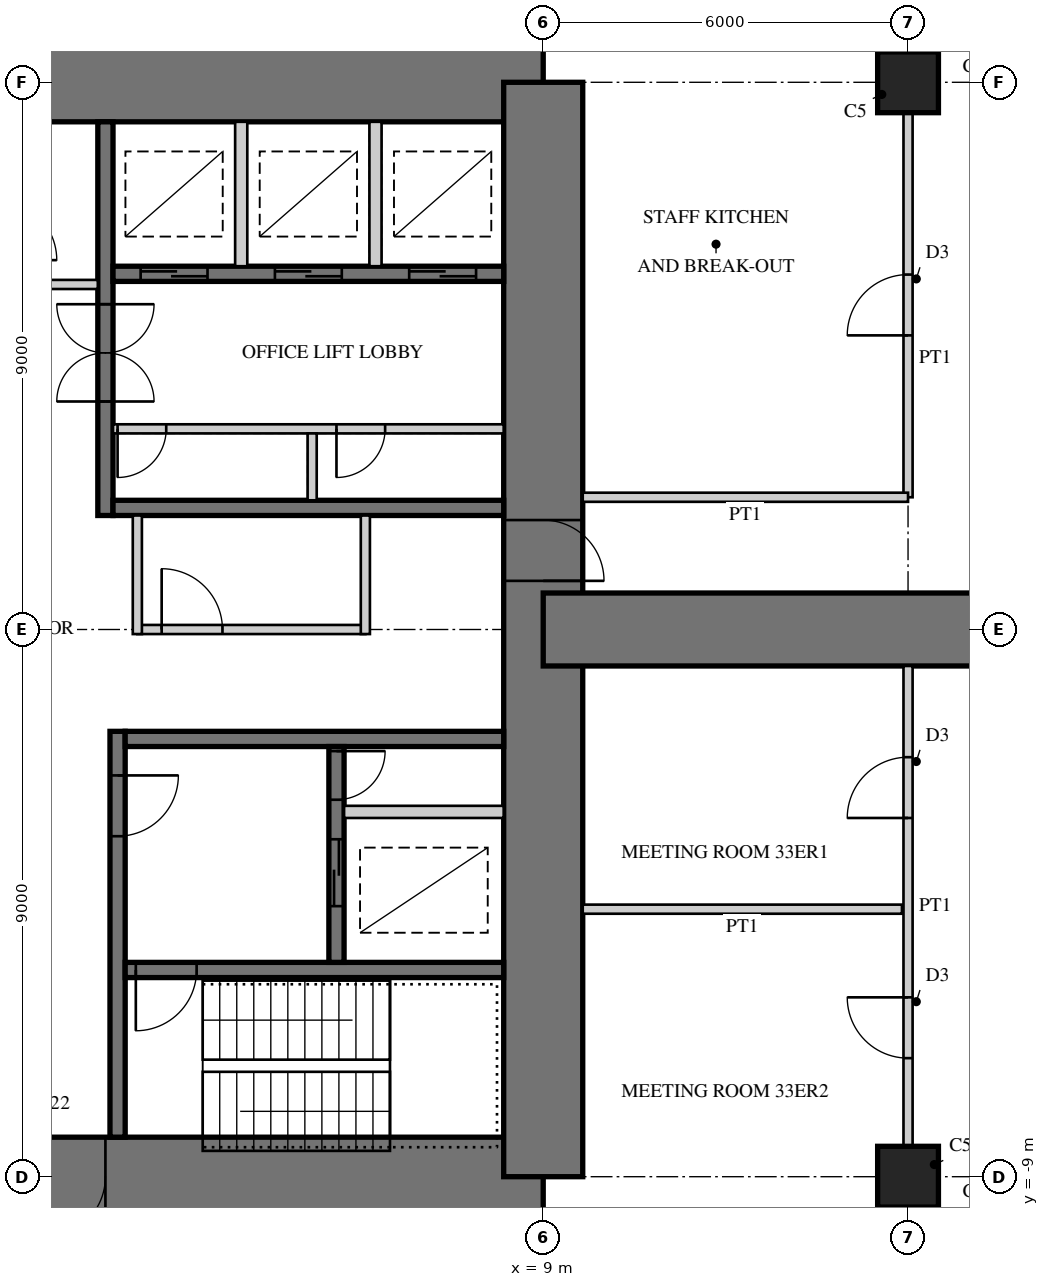
"""IFC4 building model, lengths in metres.
Left out: names, types, materials, properties, quantities, classifications, styles, units other than length and angle.
Written with IfcOpenShell. Run it as: python <this file> out.ifc"""

import sys

from ifc_helpers import new_model, si_unit, direction, frame, frame_2d, origin, origin_2d, place, context, subcontext, project, spatial, rectangle, extrude, element, fill, save


model = new_model("IFC4")
c1 = context("Model", 3, precision=1e-05, world=origin(), true_north=direction((0.0, 1.0)))
c2 = subcontext(c1, "Body", "Model", "MODEL_VIEW")
j1 = project(units=[si_unit("LENGTHUNIT", "METRE"), si_unit("PLANEANGLEUNIT", "RADIAN")], contexts=[c1])
p1 = place(None, origin())
s1 = spatial("IfcSite", under=j1, at=p1, CompositionType="ELEMENT")
p2 = place(p1, origin())
s2 = spatial("IfcBuilding", under=s1, at=p2, CompositionType="ELEMENT")
p3 = place(p2, frame((0.0, 0.0, 136.5)))
s3 = spatial("IfcBuildingStorey", under=s2, at=p3, CompositionType="ELEMENT", Elevation=136.5)
p4 = place(p3, frame((9.0, 9.0, 0.0), z_axis=(0.0, 0.0, 1.0), x_axis=(-1.0, 0.0, 0.0)))
e1 = element("IfcWall", 1, at=p4, inside=s3, PredefinedType="SHEAR", context=c2, shape_type="SweptSolid", body=[
    extrude(rectangle(XDim=18.0, YDim=1.3, at=frame_2d((9.0, 0.0))), origin(), (0.0, 0.0, 1.0), 4.0),
])
p5 = place(p4, frame((9.8, 0.0, 0.0)))
e2 = element("IfcOpeningElement", 2, at=p5, cuts=e1, PredefinedType="OPENING", context=c2, shape_type="SweptSolid", body=[
    extrude(rectangle(XDim=1.0, YDim=2.4, at=frame_2d((0.5, 1.2))), frame((0.0, 0.66, 0.0), z_axis=(0.0, -1.0, 0.0), x_axis=(1.0, 0.0, 0.0)), (0.0, 0.0, 1.0), 1.32),
])
p6 = place(p3, frame((-9.0, -9.0, 0.0), z_axis=(0.0, 0.0, 1.0), x_axis=(1.0, 0.0, 0.0)))
e3 = element("IfcWall", 3, at=p6, inside=s3, PredefinedType="SHEAR", context=c2, shape_type="SweptSolid", body=[
    extrude(rectangle(XDim=18.0, YDim=1.3, at=frame_2d((9.0, 0.0))), origin(), (0.0, 0.0, 1.0), 4.0),
])
p7 = place(p6, frame((9.8, 0.0, 0.0)))
e4 = element("IfcOpeningElement", 4, at=p7, cuts=e3, PredefinedType="OPENING", context=c2, shape_type="SweptSolid", body=[
    extrude(rectangle(XDim=1.0, YDim=2.4, at=frame_2d((0.5, 1.2))), frame((0.0, 0.66, 0.0), z_axis=(0.0, -1.0, 0.0), x_axis=(1.0, 0.0, 0.0)), (0.0, 0.0, 1.0), 1.32),
])
p8 = place(p3, frame((9.0, -9.0, 0.0), z_axis=(0.0, 0.0, 1.0), x_axis=(0.0, 1.0, 0.0)))
e5 = element("IfcWall", 5, at=p8, inside=s3, PredefinedType="SHEAR", context=c2, shape_type="SweptSolid", body=[
    extrude(rectangle(XDim=18.0, YDim=1.3, at=frame_2d((9.0, 0.0))), origin(), (0.0, 0.0, 1.0), 4.0),
])
p9 = place(p8, frame((9.8, 0.0, 0.0)))
e6 = element("IfcOpeningElement", 6, at=p9, cuts=e5, PredefinedType="OPENING", context=c2, shape_type="SweptSolid", body=[
    extrude(rectangle(XDim=1.0, YDim=2.4, at=frame_2d((0.5, 1.2))), frame((0.0, 0.66, 0.0), z_axis=(0.0, -1.0, 0.0), x_axis=(1.0, 0.0, 0.0)), (0.0, 0.0, 1.0), 1.32),
])
p10 = place(p3, frame((1.8, 1.875, 0.0), z_axis=(0.0, 0.0, 1.0), x_axis=(0.0, 1.0, 0.0)))
e7 = element("IfcWall", 7, at=p10, inside=s3, PredefinedType="SHEAR", context=c2, shape_type="SweptSolid", body=[
    extrude(rectangle(XDim=6.475, YDim=0.25, at=frame_2d((3.238, 0.0))), origin(), (0.0, 0.0, 1.0), 4.0),
])
p11 = place(p10, frame((1.875, 0.0, 0.0)))
e8 = element("IfcOpeningElement", 8, at=p11, cuts=e7, PredefinedType="OPENING", context=c2, shape_type="SweptSolid", body=[
    extrude(rectangle(XDim=1.6, YDim=2.4, at=frame_2d((0.8, 1.2))), frame((0.0, 0.135, 0.0), z_axis=(0.0, -1.0, 0.0), x_axis=(1.0, 0.0, 0.0)), (0.0, 0.0, 1.0), 0.27),
])
p12 = place(p3, frame((1.925, 2.0, 0.0), z_axis=(0.0, 0.0, 1.0), x_axis=(1.0, 0.0, 0.0)))
e9 = element("IfcWall", 9, at=p12, inside=s3, PredefinedType="SHEAR", context=c2, shape_type="SweptSolid", body=[
    extrude(rectangle(XDim=6.425, YDim=0.25, at=frame_2d((3.212, 0.0))), origin(), (0.0, 0.0, 1.0), 4.0),
])
p13 = place(p3, frame((1.925, 5.85, 0.0), z_axis=(0.0, 0.0, 1.0), x_axis=(1.0, 0.0, 0.0)))
e10 = element("IfcWall", 10, at=p13, inside=s3, PredefinedType="SHEAR", context=c2, shape_type="SweptSolid", body=[
    extrude(rectangle(XDim=6.425, YDim=0.25, at=frame_2d((3.212, 0.0))), origin(), (0.0, 0.0, 1.0), 4.0),
])
p14 = place(p13, frame((0.454, 0.0, 0.0)))
e11 = element("IfcOpeningElement", 11, at=p14, cuts=e10, PredefinedType="OPENING", context=c2, shape_type="SweptSolid", body=[
    extrude(rectangle(XDim=1.1, YDim=2.2, at=frame_2d((0.55, 1.1))), frame((0.0, 0.135, 0.0), z_axis=(0.0, -1.0, 0.0), x_axis=(1.0, 0.0, 0.0)), (0.0, 0.0, 1.0), 0.27),
])
p15 = place(p13, frame((2.663, 0.0, 0.0)))
e12 = element("IfcOpeningElement", 12, at=p15, cuts=e10, PredefinedType="OPENING", context=c2, shape_type="SweptSolid", body=[
    extrude(rectangle(XDim=1.1, YDim=2.2, at=frame_2d((0.55, 1.1))), frame((0.0, 0.135, 0.0), z_axis=(0.0, -1.0, 0.0), x_axis=(1.0, 0.0, 0.0)), (0.0, 0.0, 1.0), 0.27),
])
p16 = place(p13, frame((4.871, 0.0, 0.0)))
e13 = element("IfcOpeningElement", 13, at=p16, cuts=e10, PredefinedType="OPENING", context=c2, shape_type="SweptSolid", body=[
    extrude(rectangle(XDim=1.1, YDim=2.2, at=frame_2d((0.55, 1.1))), frame((0.0, 0.135, 0.0), z_axis=(0.0, -1.0, 0.0), x_axis=(1.0, 0.0, 0.0)), (0.0, 0.0, 1.0), 0.27),
])
p17 = place(p3, frame((1.925, 3.3, 0.0), z_axis=(0.0, 0.0, 1.0), x_axis=(1.0, 0.0, 0.0)))
e14 = element("IfcWall", 14, at=p17, inside=s3, PredefinedType="PARTITIONING", context=c2, shape_type="SweptSolid", body=[
    extrude(rectangle(XDim=6.425, YDim=0.15, at=frame_2d((3.212, 0.0))), origin(), (0.0, 0.0, 1.0), 4.0),
])
p18 = place(p17, frame((0.075, 0.0, 0.0)))
e15 = element("IfcOpeningElement", 15, at=p18, cuts=e14, PredefinedType="OPENING", context=c2, shape_type="SweptSolid", body=[
    extrude(rectangle(XDim=0.8, YDim=2.1, at=frame_2d((0.4, 1.05))), frame((0.0, 0.085, 0.0), z_axis=(0.0, -1.0, 0.0), x_axis=(1.0, 0.0, 0.0)), (0.0, 0.0, 1.0), 0.17),
])
p19 = place(p17, frame((3.675, 0.0, 0.0)))
e16 = element("IfcOpeningElement", 16, at=p19, cuts=e14, PredefinedType="OPENING", context=c2, shape_type="SweptSolid", body=[
    extrude(rectangle(XDim=0.8, YDim=2.1, at=frame_2d((0.4, 1.05))), frame((0.0, 0.085, 0.0), z_axis=(0.0, -1.0, 0.0), x_axis=(1.0, 0.0, 0.0)), (0.0, 0.0, 1.0), 0.17),
])
p20 = place(p3, frame((5.2, 2.125, 0.0), z_axis=(0.0, 0.0, 1.0), x_axis=(0.0, 1.0, 0.0)))
e17 = element("IfcWall", 17, at=p20, inside=s3, PredefinedType="PARTITIONING", context=c2, shape_type="SweptSolid", body=[
    extrude(rectangle(XDim=1.1, YDim=0.15, at=frame_2d((0.55, 0.0))), origin(), (0.0, 0.0, 1.0), 4.0),
])
for number, where, z_axis, x_axis in (
    (18, (4.033, 5.975, 0.0), (0.0, 0.0, 1.0), (0.0, 1.0, 0.0)),
    (19, (6.242, 5.975, 0.0), (0.0, 0.0, 1.0), (0.0, 1.0, 0.0)),
):
    element("IfcWall", number, at=place(p3, frame(where, z_axis=z_axis, x_axis=x_axis)), inside=s3, PredefinedType="PARTITIONING", context=c2, shape_type="SweptSolid", body=[
        extrude(rectangle(XDim=2.375, YDim=0.2, at=frame_2d((1.188, 0.0))), origin(), (0.0, 0.0, 1.0), 4.0),
    ])
p21 = place(p3, frame((2.0, -1.675, 0.0), z_axis=(0.0, 0.0, 1.0), x_axis=(0.0, -1.0, 0.0)))
e20 = element("IfcWall", 20, at=p21, inside=s3, PredefinedType="SHEAR", context=c2, shape_type="SweptSolid", body=[
    extrude(rectangle(XDim=6.675, YDim=0.25, at=frame_2d((3.337, 0.0))), origin(), (0.0, 0.0, 1.0), 4.0),
])
p22 = place(p21, frame((0.725, 0.0, 0.0)))
e21 = element("IfcOpeningElement", 21, at=p22, cuts=e20, PredefinedType="OPENING", context=c2, shape_type="SweptSolid", body=[
    extrude(rectangle(XDim=1.0, YDim=2.1, at=frame_2d((0.5, 1.05))), frame((0.0, 0.135, 0.0), z_axis=(0.0, -1.0, 0.0), x_axis=(1.0, 0.0, 0.0)), (0.0, 0.0, 1.0), 0.27),
])
p23 = place(p3, frame((2.125, -1.8, 0.0), z_axis=(0.0, 0.0, 1.0), x_axis=(1.0, 0.0, 0.0)))
e22 = element("IfcWall", 22, at=p23, inside=s3, PredefinedType="SHEAR", context=c2, shape_type="SweptSolid", body=[
    extrude(rectangle(XDim=6.225, YDim=0.25, at=frame_2d((3.113, 0.0))), origin(), (0.0, 0.0, 1.0), 4.0),
])
p24 = place(p3, frame((2.125, -5.6, 0.0), z_axis=(0.0, 0.0, 1.0), x_axis=(1.0, 0.0, 0.0)))
e23 = element("IfcWall", 23, at=p24, inside=s3, PredefinedType="SHEAR", context=c2, shape_type="SweptSolid", body=[
    extrude(rectangle(XDim=6.225, YDim=0.25, at=frame_2d((3.113, 0.0))), origin(), (0.0, 0.0, 1.0), 4.0),
])
p25 = place(p24, frame((0.175, 0.0, 0.0)))
e24 = element("IfcOpeningElement", 24, at=p25, cuts=e23, PredefinedType="OPENING", context=c2, shape_type="SweptSolid", body=[
    extrude(rectangle(XDim=1.0, YDim=2.1, at=frame_2d((0.5, 1.05))), frame((0.0, 0.135, 0.0), z_axis=(0.0, -1.0, 0.0), x_axis=(1.0, 0.0, 0.0)), (0.0, 0.0, 1.0), 0.27),
])
p26 = place(p3, frame((5.6, -1.925, 0.0), z_axis=(0.0, 0.0, 1.0), x_axis=(0.0, -1.0, 0.0)))
e25 = element("IfcWall", 25, at=p26, inside=s3, PredefinedType="SHEAR", context=c2, shape_type="SweptSolid", body=[
    extrude(rectangle(XDim=3.55, YDim=0.25, at=frame_2d((1.775, 0.0))), origin(), (0.0, 0.0, 1.0), 4.0),
])
p27 = place(p26, frame((1.525, 0.0, 0.0)))
e26 = element("IfcOpeningElement", 26, at=p27, cuts=e25, PredefinedType="OPENING", context=c2, shape_type="SweptSolid", body=[
    extrude(rectangle(XDim=1.1, YDim=2.2, at=frame_2d((0.55, 1.1))), frame((0.0, 0.135, 0.0), z_axis=(0.0, -1.0, 0.0), x_axis=(1.0, 0.0, 0.0)), (0.0, 0.0, 1.0), 0.27),
])
p28 = place(p26, frame((0.075, 0.0, 0.0)))
e27 = element("IfcOpeningElement", 27, at=p28, cuts=e25, PredefinedType="OPENING", context=c2, shape_type="SweptSolid", body=[
    extrude(rectangle(XDim=0.8, YDim=2.1, at=frame_2d((0.4, 1.05))), frame((0.0, 0.135, 0.0), z_axis=(0.0, -1.0, 0.0), x_axis=(1.0, 0.0, 0.0)), (0.0, 0.0, 1.0), 0.27),
])
p29 = place(p3, frame((5.725, -3.0, 0.0), z_axis=(0.0, 0.0, 1.0), x_axis=(1.0, 0.0, 0.0)))
e28 = element("IfcWall", 28, at=p29, inside=s3, PredefinedType="PARTITIONING", context=c2, shape_type="SweptSolid", body=[
    extrude(rectangle(XDim=2.625, YDim=0.2, at=frame_2d((1.312, 0.0))), origin(), (0.0, 0.0, 1.0), 4.0),
])
p30 = place(p3, frame((9.0, 0.0, 0.0), z_axis=(0.0, 0.0, 1.0), x_axis=(1.0, 0.0, 0.0)))
e29 = element("IfcWall", 29, at=p30, inside=s3, PredefinedType="SHEAR", context=c2, shape_type="SweptSolid", body=[
    extrude(rectangle(XDim=18.0, YDim=1.2, at=frame_2d((9.0, 0.0))), origin(), (0.0, 0.0, 1.0), 4.0),
])
p31 = place(p30, frame((9.8, 0.0, 0.0)))
e30 = element("IfcOpeningElement", 30, at=p31, cuts=e29, PredefinedType="OPENING", context=c2, shape_type="SweptSolid", body=[
    extrude(rectangle(XDim=1.0, YDim=2.2, at=frame_2d((0.5, 1.1))), frame((0.0, 0.61, 0.0), z_axis=(0.0, -1.0, 0.0), x_axis=(1.0, 0.0, 0.0)), (0.0, 0.0, 1.0), 1.22),
])
for number, where, z_axis, x_axis in (
    (31, (15.0, -9.0, 0.0), (0.0, 0.0, 1.0), (1.0, 0.0, 0.0)),
    (32, (15.0, 9.0, 0.0), (0.0, 0.0, 1.0), (1.0, 0.0, 0.0)),
):
    element("IfcColumn", number, at=place(p3, frame(where, z_axis=z_axis, x_axis=x_axis)), inside=s3, PredefinedType="COLUMN", context=c2, shape_type="SweptSolid", body=[
        extrude(rectangle(XDim=1.0, YDim=1.0, at=origin_2d()), origin(), (0.0, 0.0, 1.0), 4.0),
    ])
p32 = place(p3, frame((2.325, 0.0, 0.0), z_axis=(0.0, 0.0, 1.0), x_axis=(1.0, 0.0, 0.0)))
e33 = element("IfcWall", 33, at=p32, inside=s3, PredefinedType="PARTITIONING", context=c2, shape_type="SweptSolid", body=[
    extrude(rectangle(XDim=3.75, YDim=0.15, at=frame_2d((1.875, 0.0))), origin(), (0.0, 0.0, 1.0), 3.8),
])
p33 = place(p32, frame((0.4, 0.0, 0.0)))
e34 = element("IfcOpeningElement", 34, at=p33, cuts=e33, PredefinedType="OPENING", context=c2, shape_type="SweptSolid", body=[
    extrude(rectangle(XDim=1.0, YDim=2.1, at=frame_2d((0.5, 1.05))), frame((0.0, 0.085, 0.0), z_axis=(0.0, -1.0, 0.0), x_axis=(1.0, 0.0, 0.0)), (0.0, 0.0, 1.0), 0.17),
])
for number, where, z_axis, x_axis in (
    (35, (2.325, 1.875, 0.0), (0.0, 0.0, 1.0), (0.0, -1.0, 0.0)),
    (36, (6.075, -0.075, 0.0), (0.0, 0.0, 1.0), (0.0, 1.0, 0.0)),
):
    element("IfcWall", number, at=place(p3, frame(where, z_axis=z_axis, x_axis=x_axis)), inside=s3, PredefinedType="PARTITIONING", context=c2, shape_type="SweptSolid", body=[
        extrude(rectangle(XDim=1.95, YDim=0.15, at=frame_2d((0.975, 0.0))), origin(), (0.0, 0.0, 1.0), 3.8),
    ])
p34 = place(p3, frame((1.675, 5.675, 0.0), z_axis=(0.0, 0.0, 1.0), x_axis=(-1.0, 0.0, 0.0)))
e37 = element("IfcWall", 37, at=p34, inside=s3, PredefinedType="PARTITIONING", context=c2, shape_type="SweptSolid", body=[
    extrude(rectangle(XDim=1.75, YDim=0.15, at=frame_2d((0.875, 0.0))), origin(), (0.0, 0.0, 1.0), 3.8),
])
p35 = place(p3, frame((15.0, 2.175, 0.0), z_axis=(0.0, 0.0, 1.0), x_axis=(0.0, 1.0, 0.0)))
e38 = element("IfcWall", 38, at=p35, inside=s3, PredefinedType="PARTITIONING", context=c2, shape_type="SweptSolid", body=[
    extrude(rectangle(XDim=6.325, YDim=0.15, at=frame_2d((3.163, 0.0))), origin(), (0.0, 0.0, 1.0), 3.0),
])
p36 = place(p35, frame((2.663, 0.0, 0.0)))
e39 = element("IfcOpeningElement", 39, at=p36, cuts=e38, PredefinedType="OPENING", context=c2, shape_type="SweptSolid", body=[
    extrude(rectangle(XDim=1.0, YDim=2.1, at=frame_2d((0.5, 1.05))), frame((0.0, 0.085, 0.0), z_axis=(0.0, -1.0, 0.0), x_axis=(1.0, 0.0, 0.0)), (0.0, 0.0, 1.0), 0.17),
])
p37 = place(p3, frame((9.65, 2.175, 0.0), z_axis=(0.0, 0.0, 1.0), x_axis=(1.0, 0.0, 0.0)))
e40 = element("IfcWall", 40, at=p37, inside=s3, PredefinedType="PARTITIONING", context=c2, shape_type="SweptSolid", body=[
    extrude(rectangle(XDim=5.35, YDim=0.15, at=frame_2d((2.675, 0.0))), origin(), (0.0, 0.0, 1.0), 3.8),
])
p38 = place(p3, frame((15.0, -8.5, 0.0), z_axis=(0.0, 0.0, 1.0), x_axis=(0.0, 1.0, 0.0)))
e41 = element("IfcWall", 41, at=p38, inside=s3, PredefinedType="PARTITIONING", context=c2, shape_type="SweptSolid", body=[
    extrude(rectangle(XDim=7.9, YDim=0.15, at=frame_2d((3.95, 0.0))), origin(), (0.0, 0.0, 1.0), 3.0),
])
p39 = place(p38, frame((1.45, 0.0, 0.0)))
e42 = element("IfcOpeningElement", 42, at=p39, cuts=e41, PredefinedType="OPENING", context=c2, shape_type="SweptSolid", body=[
    extrude(rectangle(XDim=1.0, YDim=2.1, at=frame_2d((0.5, 1.05))), frame((0.0, 0.085, 0.0), z_axis=(0.0, -1.0, 0.0), x_axis=(1.0, 0.0, 0.0)), (0.0, 0.0, 1.0), 0.17),
])
p40 = place(p38, frame((5.4, 0.0, 0.0)))
e43 = element("IfcOpeningElement", 43, at=p40, cuts=e41, PredefinedType="OPENING", context=c2, shape_type="SweptSolid", body=[
    extrude(rectangle(XDim=1.0, YDim=2.1, at=frame_2d((0.5, 1.05))), frame((0.0, 0.085, 0.0), z_axis=(0.0, -1.0, 0.0), x_axis=(1.0, 0.0, 0.0)), (0.0, 0.0, 1.0), 0.17),
])
p41 = place(p3, frame((9.65, -4.6, 0.0), z_axis=(0.0, 0.0, 1.0), x_axis=(1.0, 0.0, 0.0)))
e44 = element("IfcWall", 44, at=p41, inside=s3, PredefinedType="PARTITIONING", context=c2, shape_type="SweptSolid", body=[
    extrude(rectangle(XDim=5.25, YDim=0.15, at=frame_2d((2.625, 0.0))), origin(), (0.0, 0.0, 1.0), 3.8),
])
p42 = place(p33, origin())
e45 = element("IfcDoor", 45, at=p42, inside=s3, OperationType="SINGLE_SWING_LEFT", PredefinedType="DOOR", context=c2, shape_type="SweptSolid", body=[
    extrude(rectangle(XDim=1.0, YDim=2.1, at=frame_2d((0.5, 1.05))), frame((0.0, 0.025, 0.0), z_axis=(0.0, -1.0, 0.0), x_axis=(1.0, 0.0, 0.0)), (0.0, 0.0, 1.0), 0.05),
])
fill(e34, e45)
p43 = place(p36, origin())
e46 = element("IfcDoor", 46, at=p43, inside=s3, OperationType="SINGLE_SWING_LEFT", PredefinedType="DOOR", context=c2, shape_type="SweptSolid", body=[
    extrude(rectangle(XDim=1.0, YDim=2.1, at=frame_2d((0.5, 1.05))), frame((0.0, 0.025, 0.0), z_axis=(0.0, -1.0, 0.0), x_axis=(1.0, 0.0, 0.0)), (0.0, 0.0, 1.0), 0.05),
])
fill(e39, e46)
p44 = place(p39, origin())
e47 = element("IfcDoor", 47, at=p44, inside=s3, OperationType="SINGLE_SWING_RIGHT", PredefinedType="DOOR", context=c2, shape_type="SweptSolid", body=[
    extrude(rectangle(XDim=1.0, YDim=2.1, at=frame_2d((0.5, 1.05))), frame((0.0, 0.025, 0.0), z_axis=(0.0, -1.0, 0.0), x_axis=(1.0, 0.0, 0.0)), (0.0, 0.0, 1.0), 0.05),
])
fill(e42, e47)
p45 = place(p40, origin())
e48 = element("IfcDoor", 48, at=p45, inside=s3, OperationType="SINGLE_SWING_LEFT", PredefinedType="DOOR", context=c2, shape_type="SweptSolid", body=[
    extrude(rectangle(XDim=1.0, YDim=2.1, at=frame_2d((0.5, 1.05))), frame((0.0, 0.025, 0.0), z_axis=(0.0, -1.0, 0.0), x_axis=(1.0, 0.0, 0.0)), (0.0, 0.0, 1.0), 0.05),
])
fill(e43, e48)
p46 = place(p7, frame((1.0, 0.0, 0.0), z_axis=(0.0, 0.0, 1.0), x_axis=(-1.0, 0.0, 0.0)))
e49 = element("IfcDoor", 49, at=p46, inside=s3, OperationType="SINGLE_SWING_RIGHT", PredefinedType="DOOR", context=c2, shape_type="SweptSolid", body=[
    extrude(rectangle(XDim=1.0, YDim=2.4, at=frame_2d((0.5, 1.2))), frame((0.0, -0.005, 0.0), z_axis=(0.0, -1.0, 0.0), x_axis=(1.0, 0.0, 0.0)), (0.0, 0.0, 1.0), 0.05),
])
fill(e4, e49)
p47 = place(p9, frame((1.0, 0.0, 0.0), z_axis=(0.0, 0.0, 1.0), x_axis=(-1.0, 0.0, 0.0)))
e50 = element("IfcDoor", 50, at=p47, inside=s3, OperationType="SINGLE_SWING_RIGHT", PredefinedType="DOOR", context=c2, shape_type="SweptSolid", body=[
    extrude(rectangle(XDim=1.0, YDim=2.4, at=frame_2d((0.5, 1.2))), frame((0.0, -0.005, 0.0), z_axis=(0.0, -1.0, 0.0), x_axis=(1.0, 0.0, 0.0)), (0.0, 0.0, 1.0), 0.05),
])
fill(e6, e50)
p48 = place(p14, origin())
e51 = element("IfcDoor", 51, at=p48, inside=s3, OperationType="DOUBLE_DOOR_SLIDING", PredefinedType="DOOR", context=c2, shape_type="SweptSolid", body=[
    extrude(rectangle(XDim=1.1, YDim=2.2, at=frame_2d((0.55, 1.1))), frame((0.0, 0.025, 0.0), z_axis=(0.0, -1.0, 0.0), x_axis=(1.0, 0.0, 0.0)), (0.0, 0.0, 1.0), 0.05),
])
fill(e11, e51)
p49 = place(p15, origin())
e52 = element("IfcDoor", 52, at=p49, inside=s3, OperationType="DOUBLE_DOOR_SLIDING", PredefinedType="DOOR", context=c2, shape_type="SweptSolid", body=[
    extrude(rectangle(XDim=1.1, YDim=2.2, at=frame_2d((0.55, 1.1))), frame((0.0, 0.025, 0.0), z_axis=(0.0, -1.0, 0.0), x_axis=(1.0, 0.0, 0.0)), (0.0, 0.0, 1.0), 0.05),
])
fill(e12, e52)
p50 = place(p16, origin())
e53 = element("IfcDoor", 53, at=p50, inside=s3, OperationType="DOUBLE_DOOR_SLIDING", PredefinedType="DOOR", context=c2, shape_type="SweptSolid", body=[
    extrude(rectangle(XDim=1.1, YDim=2.2, at=frame_2d((0.55, 1.1))), frame((0.0, 0.025, 0.0), z_axis=(0.0, -1.0, 0.0), x_axis=(1.0, 0.0, 0.0)), (0.0, 0.0, 1.0), 0.05),
])
fill(e13, e53)
p51 = place(p11, origin())
e54 = element("IfcDoor", 54, at=p51, inside=s3, OperationType="DOUBLE_DOOR_DOUBLE_SWING", PredefinedType="DOOR", context=c2, shape_type="SweptSolid", body=[
    extrude(rectangle(XDim=1.6, YDim=2.4, at=frame_2d((0.8, 1.2))), frame((0.0, 0.025, 0.0), z_axis=(0.0, -1.0, 0.0), x_axis=(1.0, 0.0, 0.0)), (0.0, 0.0, 1.0), 0.05),
])
fill(e8, e54)
p52 = place(p18, frame((0.8, 0.0, 0.0), z_axis=(0.0, 0.0, 1.0), x_axis=(-1.0, 0.0, 0.0)))
e55 = element("IfcDoor", 55, at=p52, inside=s3, OperationType="SINGLE_SWING_RIGHT", PredefinedType="DOOR", context=c2, shape_type="SweptSolid", body=[
    extrude(rectangle(XDim=0.8, YDim=2.1, at=frame_2d((0.4, 1.05))), frame((0.0, 0.025, 0.0), z_axis=(0.0, -1.0, 0.0), x_axis=(1.0, 0.0, 0.0)), (0.0, 0.0, 1.0), 0.05),
])
fill(e15, e55)
p53 = place(p19, frame((0.8, 0.0, 0.0), z_axis=(0.0, 0.0, 1.0), x_axis=(-1.0, 0.0, 0.0)))
e56 = element("IfcDoor", 56, at=p53, inside=s3, OperationType="SINGLE_SWING_RIGHT", PredefinedType="DOOR", context=c2, shape_type="SweptSolid", body=[
    extrude(rectangle(XDim=0.8, YDim=2.1, at=frame_2d((0.4, 1.05))), frame((0.0, 0.025, 0.0), z_axis=(0.0, -1.0, 0.0), x_axis=(1.0, 0.0, 0.0)), (0.0, 0.0, 1.0), 0.05),
])
fill(e16, e56)
p54 = place(p22, origin())
e57 = element("IfcDoor", 57, at=p54, inside=s3, OperationType="SINGLE_SWING_LEFT", PredefinedType="DOOR", context=c2, shape_type="SweptSolid", body=[
    extrude(rectangle(XDim=1.0, YDim=2.1, at=frame_2d((0.5, 1.05))), frame((0.0, 0.025, 0.0), z_axis=(0.0, -1.0, 0.0), x_axis=(1.0, 0.0, 0.0)), (0.0, 0.0, 1.0), 0.05),
])
fill(e21, e57)
p55 = place(p25, frame((1.0, 0.0, 0.0), z_axis=(0.0, 0.0, 1.0), x_axis=(-1.0, 0.0, 0.0)))
e58 = element("IfcDoor", 58, at=p55, inside=s3, OperationType="SINGLE_SWING_RIGHT", PredefinedType="DOOR", context=c2, shape_type="SweptSolid", body=[
    extrude(rectangle(XDim=1.0, YDim=2.1, at=frame_2d((0.5, 1.05))), frame((0.0, 0.025, 0.0), z_axis=(0.0, -1.0, 0.0), x_axis=(1.0, 0.0, 0.0)), (0.0, 0.0, 1.0), 0.05),
])
fill(e24, e58)
p56 = place(p27, origin())
e59 = element("IfcDoor", 59, at=p56, inside=s3, OperationType="DOUBLE_DOOR_SLIDING", PredefinedType="DOOR", context=c2, shape_type="SweptSolid", body=[
    extrude(rectangle(XDim=1.1, YDim=2.2, at=frame_2d((0.55, 1.1))), frame((0.0, 0.025, 0.0), z_axis=(0.0, -1.0, 0.0), x_axis=(1.0, 0.0, 0.0)), (0.0, 0.0, 1.0), 0.05),
])
fill(e26, e59)
p57 = place(p28, origin())
e60 = element("IfcDoor", 60, at=p57, inside=s3, OperationType="SINGLE_SWING_LEFT", PredefinedType="DOOR", context=c2, shape_type="SweptSolid", body=[
    extrude(rectangle(XDim=0.8, YDim=2.1, at=frame_2d((0.4, 1.05))), frame((0.0, 0.025, 0.0), z_axis=(0.0, -1.0, 0.0), x_axis=(1.0, 0.0, 0.0)), (0.0, 0.0, 1.0), 0.05),
])
fill(e27, e60)
save(model, sys.argv[1])
